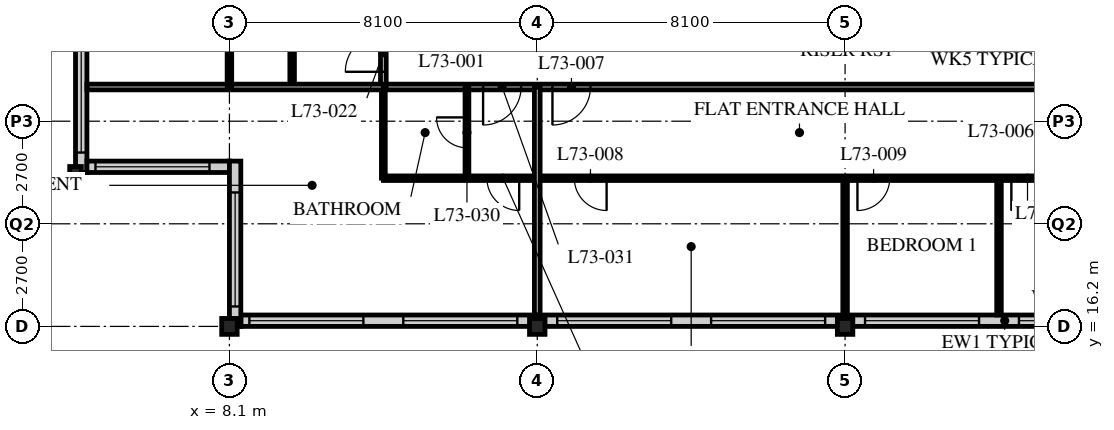
"""IFC4 building model, lengths in metres.
Left out: names, types, materials, properties, quantities, classifications, styles, units other than length and angle.
Written with IfcOpenShell. Run it as: python <this file> out.ifc"""

import sys

from ifc_helpers import new_model, si_unit, direction, frame, frame_2d, origin, origin_2d, place, context, subcontext, project, spatial, rectangle, i_section, extrude, element, fill, save


model = new_model("IFC4")
c1 = context("Model", 3, precision=1e-05, world=origin(), true_north=direction((0.0, 1.0)))
c2 = subcontext(c1, "Body", "Model", "MODEL_VIEW")
j1 = project(units=[si_unit("LENGTHUNIT", "METRE"), si_unit("PLANEANGLEUNIT", "RADIAN")], contexts=[c1])
p1 = place(None, origin())
s1 = spatial("IfcSite", under=j1, at=p1, CompositionType="ELEMENT")
p2 = place(p1, origin())
s2 = spatial("IfcBuilding", under=s1, at=p2, CompositionType="ELEMENT")
p3 = place(p2, frame((0.0, 0.0, 285.3)))
s3 = spatial("IfcBuildingStorey", under=s2, at=p3, CompositionType="ELEMENT", Elevation=285.3)
p4 = place(p3, frame((4.05, 20.25, 0.0), z_axis=(0.0, 0.0, 1.0), x_axis=(1.0, 0.0, 0.0)))
e1 = element("IfcColumn", 1, at=p4, inside=s3, PredefinedType="COLUMN", context=c2, shape_type="SweptSolid", body=[
    extrude(i_section(OverallWidth=0.307, OverallDepth=0.314, WebThickness=0.012, FlangeThickness=0.019, FilletRadius=0.015, at=origin_2d()), origin(), (0.0, 0.0, 1.0), 3.9),
])
for number, where, z_axis, x_axis in (
    (2, (8.1, 16.2, 0.0), (0.0, 0.0, 1.0), (1.0, 0.0, 0.0)),
    (3, (16.2, 16.2, 0.0), (0.0, 0.0, 1.0), (1.0, 0.0, 0.0)),
    (4, (24.3, 16.2, 0.0), (0.0, 0.0, 1.0), (1.0, 0.0, 0.0)),
):
    element("IfcColumn", number, at=place(p3, frame(where, z_axis=z_axis, x_axis=x_axis)), inside=s3, PredefinedType="COLUMN", context=c2, shape_type="SweptSolid", body=[
        extrude(i_section(OverallWidth=0.407, OverallDepth=0.419, WebThickness=0.031, FlangeThickness=0.049, FilletRadius=0.015, at=origin_2d()), origin(), (0.0, 0.0, 1.0), 3.9),
    ])
p5 = place(p3, frame((8.4, 16.35, 0.0), z_axis=(0.0, 0.0, 1.0), x_axis=(1.0, 0.0, 0.0)))
e5 = element("IfcWall", 5, at=p5, inside=s3, PredefinedType="SOLIDWALL", context=c2, shape_type="SweptSolid", body=[
    extrude(rectangle(XDim=40.2, YDim=0.3, at=frame_2d((20.1, 0.0))), origin(), (0.0, 0.0, 1.0), 3.69),
])
p6 = place(p5, frame((0.225, 0.0, 0.6)))
e6 = element("IfcOpeningElement", 6, at=p6, cuts=e5, PredefinedType="OPENING", context=c2, shape_type="SweptSolid", body=[
    extrude(rectangle(XDim=3.0, YDim=2.4, at=frame_2d((1.5, 1.2))), frame((0.0, 0.16, 0.0), z_axis=(0.0, -1.0, 0.0), x_axis=(1.0, 0.0, 0.0)), (0.0, 0.0, 1.0), 0.32),
])
p7 = place(p5, frame((4.275, 0.0, 0.6)))
e7 = element("IfcOpeningElement", 7, at=p7, cuts=e5, PredefinedType="OPENING", context=c2, shape_type="SweptSolid", body=[
    extrude(rectangle(XDim=3.0, YDim=2.4, at=frame_2d((1.5, 1.2))), frame((0.0, 0.16, 0.0), z_axis=(0.0, -1.0, 0.0), x_axis=(1.0, 0.0, 0.0)), (0.0, 0.0, 1.0), 0.32),
])
p8 = place(p5, frame((8.325, 0.0, 0.6)))
e8 = element("IfcOpeningElement", 8, at=p8, cuts=e5, PredefinedType="OPENING", context=c2, shape_type="SweptSolid", body=[
    extrude(rectangle(XDim=3.0, YDim=2.4, at=frame_2d((1.5, 1.2))), frame((0.0, 0.16, 0.0), z_axis=(0.0, -1.0, 0.0), x_axis=(1.0, 0.0, 0.0)), (0.0, 0.0, 1.0), 0.32),
])
p9 = place(p5, frame((12.375, 0.0, 0.6)))
e9 = element("IfcOpeningElement", 9, at=p9, cuts=e5, PredefinedType="OPENING", context=c2, shape_type="SweptSolid", body=[
    extrude(rectangle(XDim=3.0, YDim=2.4, at=frame_2d((1.5, 1.2))), frame((0.0, 0.16, 0.0), z_axis=(0.0, -1.0, 0.0), x_axis=(1.0, 0.0, 0.0)), (0.0, 0.0, 1.0), 0.32),
])
p10 = place(p5, frame((16.425, 0.0, 0.6)))
e10 = element("IfcOpeningElement", 10, at=p10, cuts=e5, PredefinedType="OPENING", context=c2, shape_type="SweptSolid", body=[
    extrude(rectangle(XDim=3.0, YDim=2.4, at=frame_2d((1.5, 1.2))), frame((0.0, 0.16, 0.0), z_axis=(0.0, -1.0, 0.0), x_axis=(1.0, 0.0, 0.0)), (0.0, 0.0, 1.0), 0.32),
])
p11 = place(p5, frame((20.475, 0.0, 0.6)))
e11 = element("IfcOpeningElement", 11, at=p11, cuts=e5, PredefinedType="OPENING", context=c2, shape_type="SweptSolid", body=[
    extrude(rectangle(XDim=3.0, YDim=2.4, at=frame_2d((1.5, 1.2))), frame((0.0, 0.16, 0.0), z_axis=(0.0, -1.0, 0.0), x_axis=(1.0, 0.0, 0.0)), (0.0, 0.0, 1.0), 0.32),
])
p12 = place(p5, frame((24.525, 0.0, 0.6)))
e12 = element("IfcOpeningElement", 12, at=p12, cuts=e5, PredefinedType="OPENING", context=c2, shape_type="SweptSolid", body=[
    extrude(rectangle(XDim=3.0, YDim=2.4, at=frame_2d((1.5, 1.2))), frame((0.0, 0.16, 0.0), z_axis=(0.0, -1.0, 0.0), x_axis=(1.0, 0.0, 0.0)), (0.0, 0.0, 1.0), 0.32),
])
p13 = place(p5, frame((28.575, 0.0, 0.6)))
e13 = element("IfcOpeningElement", 13, at=p13, cuts=e5, PredefinedType="OPENING", context=c2, shape_type="SweptSolid", body=[
    extrude(rectangle(XDim=3.0, YDim=2.4, at=frame_2d((1.5, 1.2))), frame((0.0, 0.16, 0.0), z_axis=(0.0, -1.0, 0.0), x_axis=(1.0, 0.0, 0.0)), (0.0, 0.0, 1.0), 0.32),
])
p14 = place(p5, frame((32.625, 0.0, 0.6)))
e14 = element("IfcOpeningElement", 14, at=p14, cuts=e5, PredefinedType="OPENING", context=c2, shape_type="SweptSolid", body=[
    extrude(rectangle(XDim=3.0, YDim=2.4, at=frame_2d((1.5, 1.2))), frame((0.0, 0.16, 0.0), z_axis=(0.0, -1.0, 0.0), x_axis=(1.0, 0.0, 0.0)), (0.0, 0.0, 1.0), 0.32),
])
p15 = place(p5, frame((36.675, 0.0, 0.6)))
e15 = element("IfcOpeningElement", 15, at=p15, cuts=e5, PredefinedType="OPENING", context=c2, shape_type="SweptSolid", body=[
    extrude(rectangle(XDim=3.0, YDim=2.4, at=frame_2d((1.5, 1.2))), frame((0.0, 0.16, 0.0), z_axis=(0.0, -1.0, 0.0), x_axis=(1.0, 0.0, 0.0)), (0.0, 0.0, 1.0), 0.32),
])
p16 = place(p3, frame((4.2, 24.6, 0.0), z_axis=(0.0, 0.0, 1.0), x_axis=(0.0, -1.0, 0.0)))
e16 = element("IfcWall", 16, at=p16, inside=s3, PredefinedType="SOLIDWALL", context=c2, shape_type="SweptSolid", body=[
    extrude(rectangle(XDim=4.35, YDim=0.3, at=frame_2d((2.175, 0.0))), origin(), (0.0, 0.0, 1.0), 3.69),
])
p17 = place(p16, frame((0.825, 0.0, 0.6)))
e17 = element("IfcOpeningElement", 17, at=p17, cuts=e16, PredefinedType="OPENING", context=c2, shape_type="SweptSolid", body=[
    extrude(rectangle(XDim=3.0, YDim=2.3, at=frame_2d((1.5, 1.15))), frame((0.0, 0.16, 0.0), z_axis=(0.0, -1.0, 0.0), x_axis=(1.0, 0.0, 0.0)), (0.0, 0.0, 1.0), 0.32),
])
p18 = place(p3, frame((4.35, 20.4, 0.0), z_axis=(0.0, 0.0, 1.0), x_axis=(1.0, 0.0, 0.0)))
e18 = element("IfcWall", 18, at=p18, inside=s3, PredefinedType="SOLIDWALL", context=c2, shape_type="SweptSolid", body=[
    extrude(rectangle(XDim=3.75, YDim=0.3, at=frame_2d((1.875, 0.0))), origin(), (0.0, 0.0, 1.0), 3.69),
])
p19 = place(p18, frame((0.225, 0.0, 0.6)))
e19 = element("IfcOpeningElement", 19, at=p19, cuts=e18, PredefinedType="OPENING", context=c2, shape_type="SweptSolid", body=[
    extrude(rectangle(XDim=3.0, YDim=2.3, at=frame_2d((1.5, 1.15))), frame((0.0, 0.16, 0.0), z_axis=(0.0, -1.0, 0.0), x_axis=(1.0, 0.0, 0.0)), (0.0, 0.0, 1.0), 0.32),
])
p20 = place(p3, frame((8.25, 20.55, 0.0), z_axis=(0.0, 0.0, 1.0), x_axis=(0.0, -1.0, 0.0)))
e20 = element("IfcWall", 20, at=p20, inside=s3, PredefinedType="SOLIDWALL", context=c2, shape_type="SweptSolid", body=[
    extrude(rectangle(XDim=4.35, YDim=0.3, at=frame_2d((2.175, 0.0))), origin(), (0.0, 0.0, 1.0), 3.69),
])
p21 = place(p20, frame((0.825, 0.0, 0.6)))
e21 = element("IfcOpeningElement", 21, at=p21, cuts=e20, PredefinedType="OPENING", context=c2, shape_type="SweptSolid", body=[
    extrude(rectangle(XDim=3.0, YDim=2.3, at=frame_2d((1.5, 1.15))), frame((0.0, 0.16, 0.0), z_axis=(0.0, -1.0, 0.0), x_axis=(1.0, 0.0, 0.0)), (0.0, 0.0, 1.0), 0.32),
])
p22 = place(p3, frame((12.15, 22.5, 0.0), z_axis=(0.0, 0.0, 1.0), x_axis=(1.0, 0.0, 0.0)))
e22 = element("IfcWall", 22, at=p22, inside=s3, PredefinedType="PARTITIONING", context=c2, shape_type="SweptSolid", body=[
    extrude(rectangle(XDim=24.3, YDim=0.15, at=frame_2d((12.15, 0.0))), origin(), (0.0, 0.0, 1.0), 3.69),
])
p23 = place(p22, frame((4.45, 0.0, 0.0)))
e23 = element("IfcOpeningElement", 23, at=p23, cuts=e22, PredefinedType="OPENING", context=c2, shape_type="SweptSolid", body=[
    extrude(rectangle(XDim=1.0, YDim=2.1, at=frame_2d((0.5, 1.05))), frame((0.0, 0.085, 0.0), z_axis=(0.0, -1.0, 0.0), x_axis=(1.0, 0.0, 0.0)), (0.0, 0.0, 1.0), 0.17),
])
p24 = place(p22, frame((22.6, 0.0, 0.0)))
e24 = element("IfcOpeningElement", 24, at=p24, cuts=e22, PredefinedType="OPENING", context=c2, shape_type="SweptSolid", body=[
    extrude(rectangle(XDim=1.0, YDim=2.1, at=frame_2d((0.5, 1.05))), frame((0.0, 0.085, 0.0), z_axis=(0.0, -1.0, 0.0), x_axis=(1.0, 0.0, 0.0)), (0.0, 0.0, 1.0), 0.17),
])
p25 = place(p22, frame((2.625, 0.0, 0.0)))
e25 = element("IfcOpeningElement", 25, at=p25, cuts=e22, PredefinedType="OPENING", context=c2, shape_type="SweptSolid", body=[
    extrude(rectangle(XDim=1.0, YDim=2.1, at=frame_2d((0.5, 1.05))), frame((0.0, 0.085, 0.0), z_axis=(0.0, -1.0, 0.0), x_axis=(1.0, 0.0, 0.0)), (0.0, 0.0, 1.0), 0.17),
])
p26 = place(p3, frame((12.15, 22.5, 0.0), z_axis=(0.0, 0.0, 1.0), x_axis=(0.0, 1.0, 0.0)))
e26 = element("IfcWall", 26, at=p26, inside=s3, PredefinedType="PARTITIONING", context=c2, shape_type="SweptSolid", body=[
    extrude(rectangle(XDim=26.1, YDim=0.15, at=frame_2d((13.05, 0.0))), origin(), (0.0, 0.0, 1.0), 3.69),
])
p27 = place(p26, frame((0.4, 0.0, 0.0)))
e27 = element("IfcOpeningElement", 27, at=p27, cuts=e26, PredefinedType="OPENING", context=c2, shape_type="SweptSolid", body=[
    extrude(rectangle(XDim=1.0, YDim=2.1, at=frame_2d((0.5, 1.05))), frame((0.0, 0.085, 0.0), z_axis=(0.0, -1.0, 0.0), x_axis=(1.0, 0.0, 0.0)), (0.0, 0.0, 1.0), 0.17),
])
p28 = place(p3, frame((24.3, 20.1, 0.0), z_axis=(0.0, 0.0, 1.0), x_axis=(0.0, -1.0, 0.0)))
e28 = element("IfcWall", 28, at=p28, inside=s3, PredefinedType="PARTITIONING", context=c2, shape_type="SweptSolid", body=[
    extrude(rectangle(XDim=3.6, YDim=0.12, at=frame_2d((1.8, 0.0))), origin(), (0.0, 0.0, 1.0), 3.078),
])
p29 = place(p3, frame((28.35, 20.1, 0.0), z_axis=(0.0, 0.0, 1.0), x_axis=(0.0, -1.0, 0.0)))
e29 = element("IfcWall", 29, at=p29, inside=s3, PredefinedType="PARTITIONING", context=c2, shape_type="SweptSolid", body=[
    extrude(rectangle(XDim=3.6, YDim=0.12, at=frame_2d((1.8, 0.0))), origin(), (0.0, 0.0, 1.0), 3.69),
])
p30 = place(p3, frame((9.75, 22.5, 0.0), z_axis=(0.0, 0.0, 1.0), x_axis=(0.0, 1.0, 0.0)))
e30 = element("IfcWall", 30, at=p30, inside=s3, PredefinedType="PARTITIONING", context=c2, shape_type="SweptSolid", body=[
    extrude(rectangle(XDim=26.1, YDim=0.12, at=frame_2d((13.05, 0.0))), origin(), (0.0, 0.0, 1.0), 3.69),
])
p31 = place(p30, frame((0.975, 0.0, 0.0)))
e31 = element("IfcOpeningElement", 31, at=p31, cuts=e30, PredefinedType="OPENING", context=c2, shape_type="SweptSolid", body=[
    extrude(rectangle(XDim=0.85, YDim=2.1, at=frame_2d((0.425, 1.05))), frame((0.0, 0.07, 0.0), z_axis=(0.0, -1.0, 0.0), x_axis=(1.0, 0.0, 0.0)), (0.0, 0.0, 1.0), 0.14),
])
p32 = place(p30, frame((10.225, 0.0, 0.0)))
e32 = element("IfcOpeningElement", 32, at=p32, cuts=e30, PredefinedType="OPENING", context=c2, shape_type="SweptSolid", body=[
    extrude(rectangle(XDim=0.85, YDim=2.1, at=frame_2d((0.425, 1.05))), frame((0.0, 0.07, 0.0), z_axis=(0.0, -1.0, 0.0), x_axis=(1.0, 0.0, 0.0)), (0.0, 0.0, 1.0), 0.14),
])
p33 = place(p30, frame((14.275, 0.0, 0.0)))
e33 = element("IfcOpeningElement", 33, at=p33, cuts=e30, PredefinedType="OPENING", context=c2, shape_type="SweptSolid", body=[
    extrude(rectangle(XDim=0.85, YDim=2.1, at=frame_2d((0.425, 1.05))), frame((0.0, 0.07, 0.0), z_axis=(0.0, -1.0, 0.0), x_axis=(1.0, 0.0, 0.0)), (0.0, 0.0, 1.0), 0.14),
])
p34 = place(p30, frame((18.325, 0.0, 0.0)))
e34 = element("IfcOpeningElement", 34, at=p34, cuts=e30, PredefinedType="OPENING", context=c2, shape_type="SweptSolid", body=[
    extrude(rectangle(XDim=0.85, YDim=2.1, at=frame_2d((0.425, 1.05))), frame((0.0, 0.07, 0.0), z_axis=(0.0, -1.0, 0.0), x_axis=(1.0, 0.0, 0.0)), (0.0, 0.0, 1.0), 0.14),
])
p35 = place(p30, frame((22.375, 0.0, 0.0)))
e35 = element("IfcOpeningElement", 35, at=p35, cuts=e30, PredefinedType="OPENING", context=c2, shape_type="SweptSolid", body=[
    extrude(rectangle(XDim=0.85, YDim=2.1, at=frame_2d((0.425, 1.05))), frame((0.0, 0.07, 0.0), z_axis=(0.0, -1.0, 0.0), x_axis=(1.0, 0.0, 0.0)), (0.0, 0.0, 1.0), 0.14),
])
p36 = place(p3, frame((12.15, 20.1, 0.0), z_axis=(0.0, 0.0, 1.0), x_axis=(1.0, 0.0, 0.0)))
e36 = element("IfcWall", 36, at=p36, inside=s3, PredefinedType="PARTITIONING", context=c2, shape_type="SweptSolid", body=[
    extrude(rectangle(XDim=20.25, YDim=0.12, at=frame_2d((10.125, 0.0))), origin(), (0.0, 0.0, 1.0), 3.69),
])
p37 = place(p36, frame((5.025, 0.0, 0.0)))
e37 = element("IfcOpeningElement", 37, at=p37, cuts=e36, PredefinedType="OPENING", context=c2, shape_type="SweptSolid", body=[
    extrude(rectangle(XDim=0.85, YDim=2.1, at=frame_2d((0.425, 1.05))), frame((0.0, 0.07, 0.0), z_axis=(0.0, -1.0, 0.0), x_axis=(1.0, 0.0, 0.0)), (0.0, 0.0, 1.0), 0.14),
])
p38 = place(p36, frame((12.475, 0.0, 0.0)))
e38 = element("IfcOpeningElement", 38, at=p38, cuts=e36, PredefinedType="OPENING", context=c2, shape_type="SweptSolid", body=[
    extrude(rectangle(XDim=0.85, YDim=2.1, at=frame_2d((0.425, 1.05))), frame((0.0, 0.07, 0.0), z_axis=(0.0, -1.0, 0.0), x_axis=(1.0, 0.0, 0.0)), (0.0, 0.0, 1.0), 0.14),
])
p39 = place(p36, frame((16.525, 0.0, 0.0)))
e39 = element("IfcOpeningElement", 39, at=p39, cuts=e36, PredefinedType="OPENING", context=c2, shape_type="SweptSolid", body=[
    extrude(rectangle(XDim=0.85, YDim=2.1, at=frame_2d((0.425, 1.05))), frame((0.0, 0.07, 0.0), z_axis=(0.0, -1.0, 0.0), x_axis=(1.0, 0.0, 0.0)), (0.0, 0.0, 1.0), 0.14),
])
p40 = place(p36, frame((2.725, 0.0, 0.0)))
e40 = element("IfcOpeningElement", 40, at=p40, cuts=e36, PredefinedType="OPENING", context=c2, shape_type="SweptSolid", body=[
    extrude(rectangle(XDim=0.85, YDim=2.1, at=frame_2d((0.425, 1.05))), frame((0.0, 0.07, 0.0), z_axis=(0.0, -1.0, 0.0), x_axis=(1.0, 0.0, 0.0)), (0.0, 0.0, 1.0), 0.14),
])
p41 = place(p3, frame((14.35, 22.5, 0.0), z_axis=(0.0, 0.0, 1.0), x_axis=(0.0, -1.0, 0.0)))
e41 = element("IfcWall", 41, at=p41, inside=s3, PredefinedType="PARTITIONING", context=c2, shape_type="SweptSolid", body=[
    extrude(rectangle(XDim=2.4, YDim=0.1, at=frame_2d((1.2, 0.0))), origin(), (0.0, 0.0, 1.0), 3.69),
])
p42 = place(p41, frame((0.8, 0.0, 0.0)))
e42 = element("IfcOpeningElement", 42, at=p42, cuts=e41, PredefinedType="OPENING", context=c2, shape_type="SweptSolid", body=[
    extrude(rectangle(XDim=0.8, YDim=2.1, at=frame_2d((0.4, 1.05))), frame((0.0, 0.06, 0.0), z_axis=(0.0, -1.0, 0.0), x_axis=(1.0, 0.0, 0.0)), (0.0, 0.0, 1.0), 0.12),
])
p43 = place(p3, frame((12.15, 22.5, 0.0), z_axis=(0.0, 0.0, 1.0), x_axis=(0.0, -1.0, 0.0)))
e43 = element("IfcWall", 43, at=p43, inside=s3, PredefinedType="PARTITIONING", context=c2, shape_type="SweptSolid", body=[
    extrude(rectangle(XDim=2.4, YDim=0.1, at=frame_2d((1.2, 0.0))), origin(), (0.0, 0.0, 1.0), 3.69),
])
p44 = place(p3, frame((4.35, 22.5, 0.0), z_axis=(0.0, 0.0, 1.0), x_axis=(1.0, 0.0, 0.0)))
e44 = element("IfcWall", 44, at=p44, inside=s3, PredefinedType="PARTITIONING", context=c2, shape_type="SweptSolid", body=[
    extrude(rectangle(XDim=7.8, YDim=0.15, at=frame_2d((3.9, 0.0))), origin(), (0.0, 0.0, 1.0), 3.69),
])
p45 = place(p3, frame((16.2, 22.5, 0.0), z_axis=(0.0, 0.0, 1.0), x_axis=(0.0, -1.0, 0.0)))
e45 = element("IfcWall", 45, at=p45, inside=s3, PredefinedType="PARTITIONING", context=c2, shape_type="SweptSolid", body=[
    extrude(rectangle(XDim=6.0, YDim=0.15, at=frame_2d((3.0, 0.0))), origin(), (0.0, 0.0, 1.0), 3.078),
])
p46 = place(p3, frame((8.1, 22.5, 0.0), z_axis=(0.0, 0.0, 1.0), x_axis=(0.0, 1.0, 0.0)))
e46 = element("IfcWall", 46, at=p46, inside=s3, PredefinedType="PARTITIONING", context=c2, shape_type="SweptSolid", body=[
    extrude(rectangle(XDim=1.597, YDim=0.12, at=frame_2d((0.798, 0.0))), origin(), (0.0, 0.0, 1.0), 3.078),
])
p47 = place(p6, origin())
e47 = element("IfcWindow", 47, at=p47, inside=s3, PartitioningType="SINGLE_PANEL", PredefinedType="WINDOW", context=c2, shape_type="SweptSolid", body=[
    extrude(rectangle(XDim=3.0, YDim=2.4, at=frame_2d((1.5, 1.2))), frame((0.0, 0.03, 0.0), z_axis=(0.0, -1.0, 0.0), x_axis=(1.0, 0.0, 0.0)), (0.0, 0.0, 1.0), 0.06),
])
fill(e6, e47)
p48 = place(p7, origin())
e48 = element("IfcWindow", 48, at=p48, inside=s3, PartitioningType="SINGLE_PANEL", PredefinedType="WINDOW", context=c2, shape_type="SweptSolid", body=[
    extrude(rectangle(XDim=3.0, YDim=2.4, at=frame_2d((1.5, 1.2))), frame((0.0, 0.03, 0.0), z_axis=(0.0, -1.0, 0.0), x_axis=(1.0, 0.0, 0.0)), (0.0, 0.0, 1.0), 0.06),
])
fill(e7, e48)
p49 = place(p8, origin())
e49 = element("IfcWindow", 49, at=p49, inside=s3, PartitioningType="SINGLE_PANEL", PredefinedType="WINDOW", context=c2, shape_type="SweptSolid", body=[
    extrude(rectangle(XDim=3.0, YDim=2.4, at=frame_2d((1.5, 1.2))), frame((0.0, 0.03, 0.0), z_axis=(0.0, -1.0, 0.0), x_axis=(1.0, 0.0, 0.0)), (0.0, 0.0, 1.0), 0.06),
])
fill(e8, e49)
p50 = place(p9, origin())
e50 = element("IfcWindow", 50, at=p50, inside=s3, PartitioningType="SINGLE_PANEL", PredefinedType="WINDOW", context=c2, shape_type="SweptSolid", body=[
    extrude(rectangle(XDim=3.0, YDim=2.4, at=frame_2d((1.5, 1.2))), frame((0.0, 0.03, 0.0), z_axis=(0.0, -1.0, 0.0), x_axis=(1.0, 0.0, 0.0)), (0.0, 0.0, 1.0), 0.06),
])
fill(e9, e50)
p51 = place(p10, origin())
e51 = element("IfcWindow", 51, at=p51, inside=s3, PartitioningType="SINGLE_PANEL", PredefinedType="WINDOW", context=c2, shape_type="SweptSolid", body=[
    extrude(rectangle(XDim=3.0, YDim=2.4, at=frame_2d((1.5, 1.2))), frame((0.0, 0.03, 0.0), z_axis=(0.0, -1.0, 0.0), x_axis=(1.0, 0.0, 0.0)), (0.0, 0.0, 1.0), 0.06),
])
fill(e10, e51)
p52 = place(p11, origin())
e52 = element("IfcWindow", 52, at=p52, inside=s3, PartitioningType="SINGLE_PANEL", PredefinedType="WINDOW", context=c2, shape_type="SweptSolid", body=[
    extrude(rectangle(XDim=3.0, YDim=2.4, at=frame_2d((1.5, 1.2))), frame((0.0, 0.03, 0.0), z_axis=(0.0, -1.0, 0.0), x_axis=(1.0, 0.0, 0.0)), (0.0, 0.0, 1.0), 0.06),
])
fill(e11, e52)
p53 = place(p17, origin())
e53 = element("IfcWindow", 53, at=p53, inside=s3, PartitioningType="SINGLE_PANEL", PredefinedType="WINDOW", context=c2, shape_type="SweptSolid", body=[
    extrude(rectangle(XDim=3.0, YDim=2.3, at=frame_2d((1.5, 1.15))), frame((0.0, 0.03, 0.0), z_axis=(0.0, -1.0, 0.0), x_axis=(1.0, 0.0, 0.0)), (0.0, 0.0, 1.0), 0.06),
])
fill(e17, e53)
p54 = place(p19, origin())
e54 = element("IfcWindow", 54, at=p54, inside=s3, PartitioningType="SINGLE_PANEL", PredefinedType="WINDOW", context=c2, shape_type="SweptSolid", body=[
    extrude(rectangle(XDim=3.0, YDim=2.3, at=frame_2d((1.5, 1.15))), frame((0.0, 0.03, 0.0), z_axis=(0.0, -1.0, 0.0), x_axis=(1.0, 0.0, 0.0)), (0.0, 0.0, 1.0), 0.06),
])
fill(e19, e54)
p55 = place(p21, origin())
e55 = element("IfcWindow", 55, at=p55, inside=s3, PartitioningType="SINGLE_PANEL", PredefinedType="WINDOW", context=c2, shape_type="SweptSolid", body=[
    extrude(rectangle(XDim=3.0, YDim=2.3, at=frame_2d((1.5, 1.15))), frame((0.0, 0.03, 0.0), z_axis=(0.0, -1.0, 0.0), x_axis=(1.0, 0.0, 0.0)), (0.0, 0.0, 1.0), 0.06),
])
fill(e21, e55)
p56 = place(p23, origin())
e56 = element("IfcDoor", 56, at=p56, inside=s3, OperationType="SINGLE_SWING_RIGHT", PredefinedType="DOOR", context=c2, shape_type="SweptSolid", body=[
    extrude(rectangle(XDim=1.0, YDim=2.1, at=frame_2d((0.5, 1.05))), frame((0.0, 0.025, 0.0), z_axis=(0.0, -1.0, 0.0), x_axis=(1.0, 0.0, 0.0)), (0.0, 0.0, 1.0), 0.05),
])
fill(e23, e56)
p57 = place(p37, origin())
e57 = element("IfcDoor", 57, at=p57, inside=s3, OperationType="SINGLE_SWING_LEFT", PredefinedType="DOOR", context=c2, shape_type="SweptSolid", body=[
    extrude(rectangle(XDim=0.85, YDim=2.1, at=frame_2d((0.425, 1.05))), frame((0.0, 0.025, 0.0), z_axis=(0.0, -1.0, 0.0), x_axis=(1.0, 0.0, 0.0)), (0.0, 0.0, 1.0), 0.05),
])
fill(e37, e57)
p58 = place(p38, origin())
e58 = element("IfcDoor", 58, at=p58, inside=s3, OperationType="SINGLE_SWING_RIGHT", PredefinedType="DOOR", context=c2, shape_type="SweptSolid", body=[
    extrude(rectangle(XDim=0.85, YDim=2.1, at=frame_2d((0.425, 1.05))), frame((0.0, 0.025, 0.0), z_axis=(0.0, -1.0, 0.0), x_axis=(1.0, 0.0, 0.0)), (0.0, 0.0, 1.0), 0.05),
])
fill(e38, e58)
p59 = place(p39, origin())
e59 = element("IfcDoor", 59, at=p59, inside=s3, OperationType="SINGLE_SWING_RIGHT", PredefinedType="DOOR", context=c2, shape_type="SweptSolid", body=[
    extrude(rectangle(XDim=0.85, YDim=2.1, at=frame_2d((0.425, 1.05))), frame((0.0, 0.025, 0.0), z_axis=(0.0, -1.0, 0.0), x_axis=(1.0, 0.0, 0.0)), (0.0, 0.0, 1.0), 0.05),
])
fill(e39, e59)
p60 = place(p27, origin())
e60 = element("IfcDoor", 60, at=p60, inside=s3, OperationType="SINGLE_SWING_LEFT", PredefinedType="DOOR", context=c2, shape_type="SweptSolid", body=[
    extrude(rectangle(XDim=1.0, YDim=2.1, at=frame_2d((0.5, 1.05))), frame((0.0, 0.025, 0.0), z_axis=(0.0, -1.0, 0.0), x_axis=(1.0, 0.0, 0.0)), (0.0, 0.0, 1.0), 0.05),
])
fill(e27, e60)
p61 = place(p42, origin())
e61 = element("IfcDoor", 61, at=p61, inside=s3, OperationType="SINGLE_SWING_RIGHT", PredefinedType="DOOR", context=c2, shape_type="SweptSolid", body=[
    extrude(rectangle(XDim=0.8, YDim=2.1, at=frame_2d((0.4, 1.05))), frame((0.0, 0.025, 0.0), z_axis=(0.0, -1.0, 0.0), x_axis=(1.0, 0.0, 0.0)), (0.0, 0.0, 1.0), 0.05),
])
fill(e42, e61)
p62 = place(p25, origin())
e62 = element("IfcDoor", 62, at=p62, inside=s3, OperationType="SINGLE_SWING_RIGHT", PredefinedType="DOOR", context=c2, shape_type="SweptSolid", body=[
    extrude(rectangle(XDim=1.0, YDim=2.1, at=frame_2d((0.5, 1.05))), frame((0.0, 0.025, 0.0), z_axis=(0.0, -1.0, 0.0), x_axis=(1.0, 0.0, 0.0)), (0.0, 0.0, 1.0), 0.05),
])
fill(e25, e62)
p63 = place(p40, origin())
e63 = element("IfcDoor", 63, at=p63, inside=s3, OperationType="SINGLE_SWING_LEFT", PredefinedType="DOOR", context=c2, shape_type="SweptSolid", body=[
    extrude(rectangle(XDim=0.85, YDim=2.1, at=frame_2d((0.425, 1.05))), frame((0.0, 0.025, 0.0), z_axis=(0.0, -1.0, 0.0), x_axis=(1.0, 0.0, 0.0)), (0.0, 0.0, 1.0), 0.05),
])
fill(e40, e63)
save(model, sys.argv[1])
